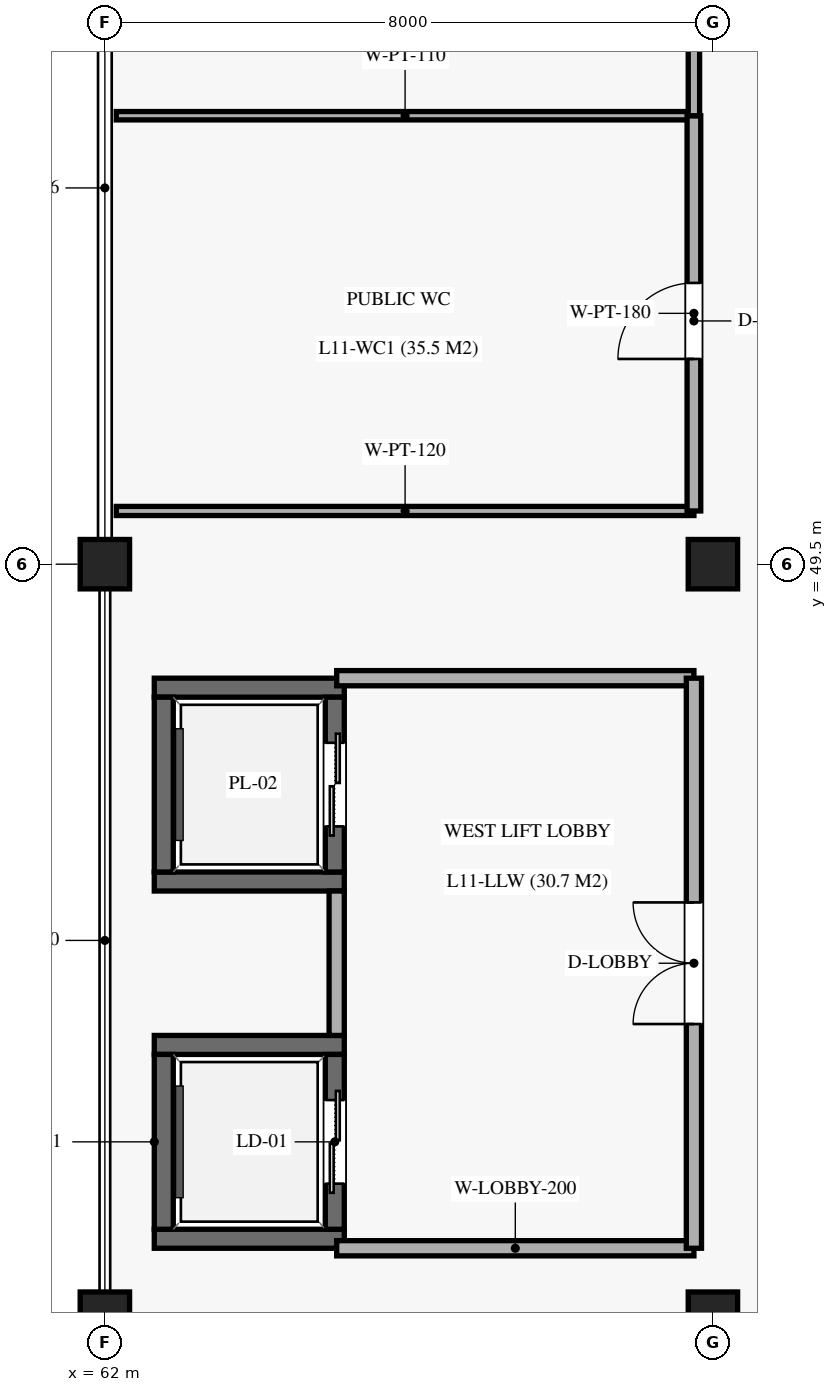
"""IFC4 building model, lengths in metres.
Left out: names, types, materials, properties, quantities, classifications, styles, units other than length and angle.
Written with IfcOpenShell. Run it as: python <this file> out.ifc"""

import sys

from ifc_helpers import new_model, si_unit, direction, frame, frame_2d, origin, origin_2d, place, context, subcontext, project, spatial, rectangle, extrude, element, fill, save


model = new_model("IFC4")
c1 = context("Model", 3, precision=1e-05, world=origin(), true_north=direction((0.0, 1.0)))
c2 = subcontext(c1, "Body", "Model", "MODEL_VIEW")
j1 = project(units=[si_unit("LENGTHUNIT", "METRE"), si_unit("PLANEANGLEUNIT", "RADIAN")], contexts=[c1])
p1 = place(None, origin())
s1 = spatial("IfcSite", under=j1, at=p1, CompositionType="ELEMENT")
p2 = place(p1, origin())
s2 = spatial("IfcBuilding", under=s1, at=p2, CompositionType="ELEMENT")
p3 = place(p2, frame((0.0, 0.0, 57.12)))
s3 = spatial("IfcBuildingStorey", under=s2, at=p3, CompositionType="ELEMENT", Elevation=57.12)
for number, where, z_axis, x_axis in (
    (1, (62.0, 39.6, 0.0), (0.0, 0.0, 1.0), (1.0, 0.0, 0.0)),
    (2, (62.0, 49.5, 0.0), (0.0, 0.0, 1.0), (1.0, 0.0, 0.0)),
    (3, (70.0, 39.6, 0.0), (0.0, 0.0, 1.0), (1.0, 0.0, 0.0)),
    (4, (70.0, 49.5, 0.0), (0.0, 0.0, 1.0), (1.0, 0.0, 0.0)),
):
    element("IfcColumn", number, at=place(p3, frame(where, z_axis=z_axis, x_axis=x_axis)), inside=s3, PredefinedType="COLUMN", context=c2, shape_type="SweptSolid", body=[
        extrude(rectangle(XDim=0.65, YDim=0.65, at=origin_2d()), origin(), (0.0, 0.0, 1.0), 5.1),
    ])
for number, where, z_axis, x_axis in (
    (5, (62.65, 40.625, 0.0), (0.0, 0.0, 1.0), (1.0, 0.0, 0.0)),
    (6, (62.65, 43.175, 0.0), (0.0, 0.0, 1.0), (1.0, 0.0, 0.0)),
):
    element("IfcWall", number, at=place(p3, frame(where, z_axis=z_axis, x_axis=x_axis)), inside=s3, PredefinedType="SOLIDWALL", context=c2, shape_type="SweptSolid", body=[
        extrude(rectangle(XDim=2.5, YDim=0.25, at=frame_2d((1.25, 0.0))), origin(), (0.0, 0.0, 1.0), 4.85),
    ])
p4 = place(p3, frame((62.775, 40.75, 0.0), z_axis=(0.0, 0.0, 1.0), x_axis=(0.0, 1.0, 0.0)))
e7 = element("IfcWall", 7, at=p4, inside=s3, PredefinedType="SOLIDWALL", context=c2, shape_type="SweptSolid", body=[
    extrude(rectangle(XDim=2.3, YDim=0.25, at=frame_2d((1.15, 0.0))), origin(), (0.0, 0.0, 1.0), 4.85),
])
p5 = place(p3, frame((65.025, 40.75, 0.0), z_axis=(0.0, 0.0, 1.0), x_axis=(0.0, 1.0, 0.0)))
e8 = element("IfcWall", 8, at=p5, inside=s3, PredefinedType="SOLIDWALL", context=c2, shape_type="SweptSolid", body=[
    extrude(rectangle(XDim=2.3, YDim=0.25, at=frame_2d((1.15, 0.0))), origin(), (0.0, 0.0, 1.0), 4.85),
])
p6 = place(p5, frame((0.6, 0.0, 0.0)))
e9 = element("IfcOpeningElement", 9, at=p6, cuts=e8, PredefinedType="OPENING", context=c2, shape_type="SweptSolid", body=[
    extrude(rectangle(XDim=1.1, YDim=2.2, at=frame_2d((0.55, 1.1))), frame((0.0, 0.135, 0.0), z_axis=(0.0, -1.0, 0.0), x_axis=(1.0, 0.0, 0.0)), (0.0, 0.0, 1.0), 0.27),
])
for number, where, z_axis, x_axis in (
    (10, (62.65, 45.325, 0.0), (0.0, 0.0, 1.0), (1.0, 0.0, 0.0)),
    (11, (62.65, 47.875, 0.0), (0.0, 0.0, 1.0), (1.0, 0.0, 0.0)),
):
    element("IfcWall", number, at=place(p3, frame(where, z_axis=z_axis, x_axis=x_axis)), inside=s3, PredefinedType="SOLIDWALL", context=c2, shape_type="SweptSolid", body=[
        extrude(rectangle(XDim=2.5, YDim=0.25, at=frame_2d((1.25, 0.0))), origin(), (0.0, 0.0, 1.0), 4.85),
    ])
p7 = place(p3, frame((62.775, 45.45, 0.0), z_axis=(0.0, 0.0, 1.0), x_axis=(0.0, 1.0, 0.0)))
e12 = element("IfcWall", 12, at=p7, inside=s3, PredefinedType="SOLIDWALL", context=c2, shape_type="SweptSolid", body=[
    extrude(rectangle(XDim=2.3, YDim=0.25, at=frame_2d((1.15, 0.0))), origin(), (0.0, 0.0, 1.0), 4.85),
])
p8 = place(p3, frame((65.025, 45.45, 0.0), z_axis=(0.0, 0.0, 1.0), x_axis=(0.0, 1.0, 0.0)))
e13 = element("IfcWall", 13, at=p8, inside=s3, PredefinedType="SOLIDWALL", context=c2, shape_type="SweptSolid", body=[
    extrude(rectangle(XDim=2.3, YDim=0.25, at=frame_2d((1.15, 0.0))), origin(), (0.0, 0.0, 1.0), 4.85),
])
p9 = place(p8, frame((0.6, 0.0, 0.0)))
e14 = element("IfcOpeningElement", 14, at=p9, cuts=e13, PredefinedType="OPENING", context=c2, shape_type="SweptSolid", body=[
    extrude(rectangle(XDim=1.1, YDim=2.2, at=frame_2d((0.55, 1.1))), frame((0.0, 0.135, 0.0), z_axis=(0.0, -1.0, 0.0), x_axis=(1.0, 0.0, 0.0)), (0.0, 0.0, 1.0), 0.27),
])
for number, where, z_axis, x_axis in (
    (15, (65.05, 40.5, 0.0), (0.0, 0.0, 1.0), (1.0, 0.0, 0.0)),
    (16, (65.05, 48.0, 0.0), (0.0, 0.0, 1.0), (1.0, 0.0, 0.0)),
):
    element("IfcWall", number, at=place(p3, frame(where, z_axis=z_axis, x_axis=x_axis)), inside=s3, PredefinedType="SOLIDWALL", context=c2, shape_type="SweptSolid", body=[
        extrude(rectangle(XDim=4.7, YDim=0.2, at=frame_2d((2.35, 0.0))), origin(), (0.0, 0.0, 1.0), 3.99),
    ])
p10 = place(p3, frame((65.05, 43.3, 0.0), z_axis=(0.0, 0.0, 1.0), x_axis=(0.0, 1.0, 0.0)))
e17 = element("IfcWall", 17, at=p10, inside=s3, PredefinedType="SOLIDWALL", context=c2, shape_type="SweptSolid", body=[
    extrude(rectangle(XDim=1.9, YDim=0.2, at=frame_2d((0.95, 0.0))), origin(), (0.0, 0.0, 1.0), 3.99),
])
p11 = place(p3, frame((69.75, 40.5, 0.0), z_axis=(0.0, 0.0, 1.0), x_axis=(0.0, 1.0, 0.0)))
e18 = element("IfcWall", 18, at=p11, inside=s3, PredefinedType="SOLIDWALL", context=c2, shape_type="SweptSolid", body=[
    extrude(rectangle(XDim=7.5, YDim=0.2, at=frame_2d((3.75, 0.0))), origin(), (0.0, 0.0, 1.0), 3.99),
])
p12 = place(p11, frame((2.95, 0.0, 0.0)))
e19 = element("IfcOpeningElement", 19, at=p12, cuts=e18, PredefinedType="OPENING", context=c2, shape_type="SweptSolid", body=[
    extrude(rectangle(XDim=1.6, YDim=2.2, at=frame_2d((0.8, 1.1))), frame((0.0, 0.11, 0.0), z_axis=(0.0, -1.0, 0.0), x_axis=(1.0, 0.0, 0.0)), (0.0, 0.0, 1.0), 0.22),
])
p13 = place(p3, frame((62.15, 50.2, 0.0), z_axis=(0.0, 0.0, 1.0), x_axis=(1.0, 0.0, 0.0)))
e20 = element("IfcWall", 20, at=p13, inside=s3, PredefinedType="PARTITIONING", context=c2, shape_type="SweptSolid", body=[
    extrude(rectangle(XDim=7.6, YDim=0.12, at=frame_2d((3.8, 0.0))), origin(), (0.0, 0.0, 1.0), 3.99),
])
p14 = place(p3, frame((62.15, 55.4, 0.0), z_axis=(0.0, 0.0, 1.0), x_axis=(1.0, 0.0, 0.0)))
e21 = element("IfcWall", 21, at=p14, inside=s3, PredefinedType="PARTITIONING", context=c2, shape_type="SweptSolid", body=[
    extrude(rectangle(XDim=7.6, YDim=0.11, at=frame_2d((3.8, 0.0))), origin(), (0.0, 0.0, 1.0), 3.99),
])
p15 = place(p3, frame((69.75, 50.2, 0.0), z_axis=(0.0, 0.0, 1.0), x_axis=(0.0, 1.0, 0.0)))
e22 = element("IfcWall", 22, at=p15, inside=s3, PredefinedType="PARTITIONING", context=c2, shape_type="SweptSolid", body=[
    extrude(rectangle(XDim=5.2, YDim=0.18, at=frame_2d((2.6, 0.0))), origin(), (0.0, 0.0, 1.0), 3.99),
])
p16 = place(p15, frame((2.0, 0.0, 0.0)))
e23 = element("IfcOpeningElement", 23, at=p16, cuts=e22, PredefinedType="OPENING", context=c2, shape_type="SweptSolid", body=[
    extrude(rectangle(XDim=1.0, YDim=2.1, at=frame_2d((0.5, 1.05))), frame((0.0, 0.1, 0.0), z_axis=(0.0, -1.0, 0.0), x_axis=(1.0, 0.0, 0.0)), (0.0, 0.0, 1.0), 0.2),
])
p17 = place(p3, frame((69.75, 55.4, 0.0), z_axis=(0.0, 0.0, 1.0), x_axis=(0.0, 1.0, 0.0)))
e24 = element("IfcWall", 24, at=p17, inside=s3, PredefinedType="PARTITIONING", context=c2, shape_type="SweptSolid", body=[
    extrude(rectangle(XDim=3.5, YDim=0.15, at=frame_2d((1.75, 0.0))), origin(), (0.0, 0.0, 1.0), 3.99),
])
p18 = place(p17, frame((1.15, 0.0, 0.0)))
e25 = element("IfcOpeningElement", 25, at=p18, cuts=e24, PredefinedType="OPENING", context=c2, shape_type="SweptSolid", body=[
    extrude(rectangle(XDim=1.05, YDim=2.15, at=frame_2d((0.525, 1.075))), frame((0.0, 0.085, 0.0), z_axis=(0.0, -1.0, 0.0), x_axis=(1.0, 0.0, 0.0)), (0.0, 0.0, 1.0), 0.17),
])
p19 = place(p6, origin())
e26 = element("IfcDoor", 26, at=p19, inside=s3, OperationType="DOUBLE_DOOR_SLIDING", PredefinedType="DOOR", context=c2, shape_type="SweptSolid", body=[
    extrude(rectangle(XDim=1.1, YDim=2.2, at=frame_2d((0.55, 1.1))), frame((0.0, 0.025, 0.0), z_axis=(0.0, -1.0, 0.0), x_axis=(1.0, 0.0, 0.0)), (0.0, 0.0, 1.0), 0.05),
])
fill(e9, e26)
p20 = place(p9, origin())
e27 = element("IfcDoor", 27, at=p20, inside=s3, OperationType="DOUBLE_DOOR_SLIDING", PredefinedType="DOOR", context=c2, shape_type="SweptSolid", body=[
    extrude(rectangle(XDim=1.1, YDim=2.2, at=frame_2d((0.55, 1.1))), frame((0.0, 0.025, 0.0), z_axis=(0.0, -1.0, 0.0), x_axis=(1.0, 0.0, 0.0)), (0.0, 0.0, 1.0), 0.05),
])
fill(e14, e27)
p21 = place(p12, origin())
e28 = element("IfcDoor", 28, at=p21, inside=s3, OperationType="DOUBLE_DOOR_SINGLE_SWING", PredefinedType="DOOR", context=c2, shape_type="SweptSolid", body=[
    extrude(rectangle(XDim=1.6, YDim=2.2, at=frame_2d((0.8, 1.1))), frame((0.0, 0.025, 0.0), z_axis=(0.0, -1.0, 0.0), x_axis=(1.0, 0.0, 0.0)), (0.0, 0.0, 1.0), 0.05),
])
fill(e19, e28)
p22 = place(p16, origin())
e29 = element("IfcDoor", 29, at=p22, inside=s3, OperationType="SINGLE_SWING_LEFT", PredefinedType="DOOR", context=c2, shape_type="SweptSolid", body=[
    extrude(rectangle(XDim=1.0, YDim=2.1, at=frame_2d((0.5, 1.05))), frame((0.0, 0.025, 0.0), z_axis=(0.0, -1.0, 0.0), x_axis=(1.0, 0.0, 0.0)), (0.0, 0.0, 1.0), 0.05),
])
fill(e23, e29)
save(model, sys.argv[1])
